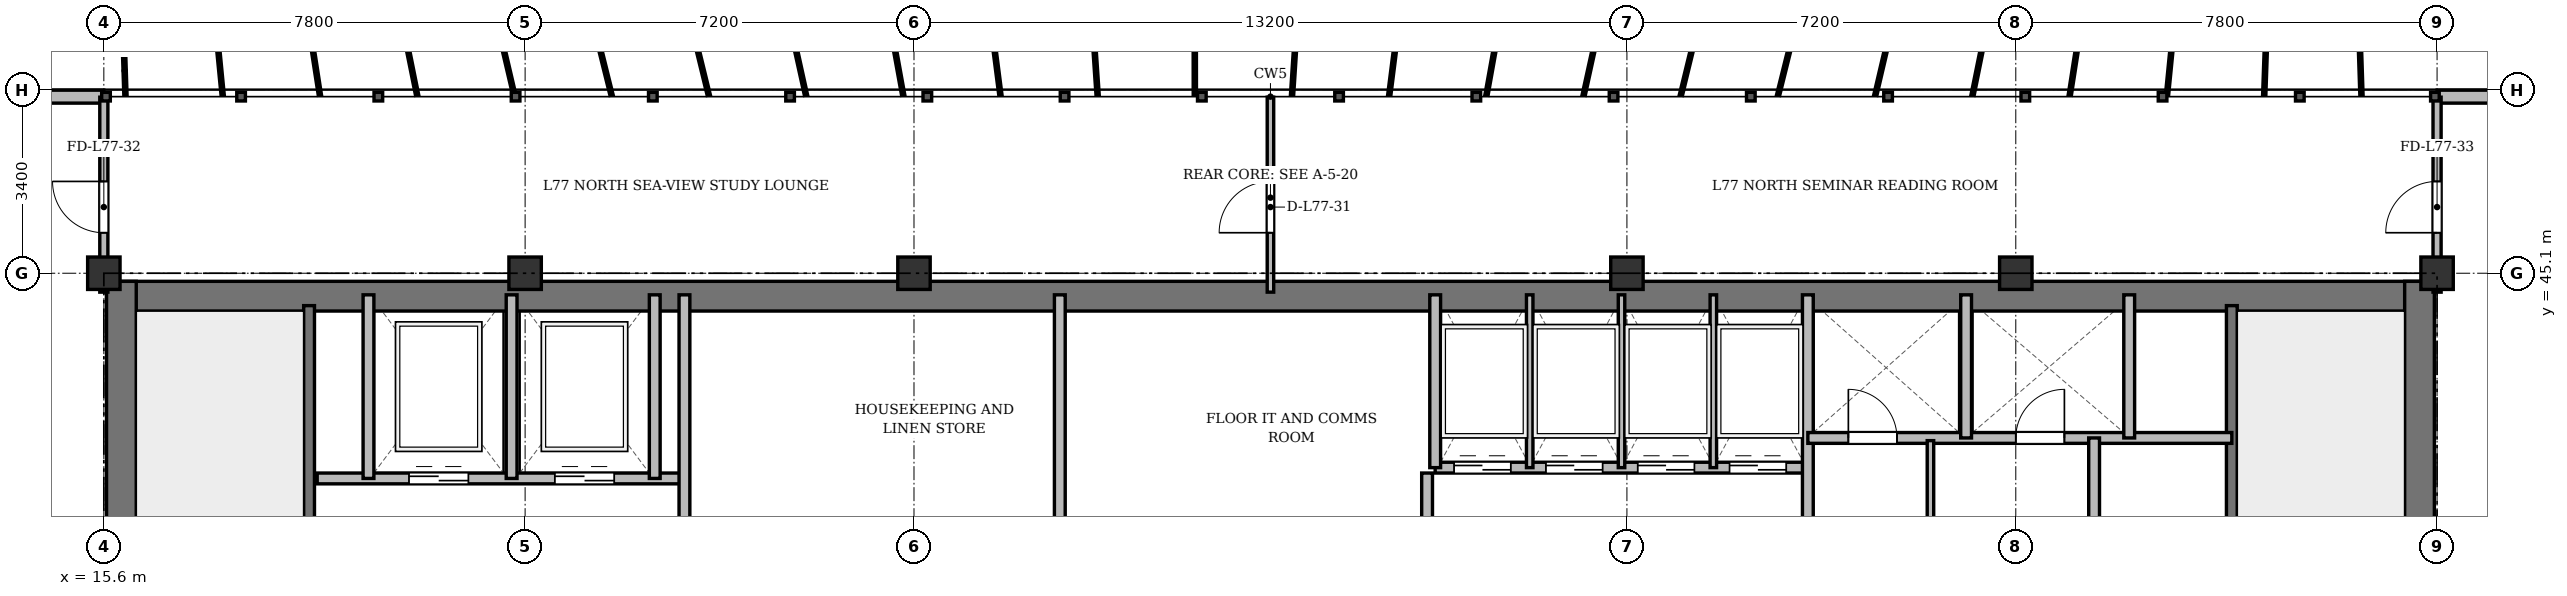
"""IFC4 building model, lengths in metres.
Left out: names, types, materials, properties, quantities, classifications, styles, units other than length and angle.
Written with IfcOpenShell. Run it as: python <this file> out.ifc"""

import sys

from ifc_helpers import new_model, si_unit, direction, frame, frame_2d, origin, origin_2d, place, context, subcontext, project, spatial, rectangle, extrude, source, transform, mapped, element, fill, save


model = new_model("IFC4")
c1 = context("Model", 3, precision=1e-05, world=origin(), true_north=direction((0.0, 1.0)))
c2 = subcontext(c1, "Body", "Model", "MODEL_VIEW")
j1 = project(units=[si_unit("LENGTHUNIT", "METRE"), si_unit("PLANEANGLEUNIT", "RADIAN")], contexts=[c1])
p1 = place(None, origin())
s1 = spatial("IfcSite", under=j1, at=p1, CompositionType="ELEMENT")
p2 = place(p1, origin())
s2 = spatial("IfcBuilding", under=s1, at=p2, CompositionType="ELEMENT")
p3 = place(p2, frame((0.0, 0.0, 295.5)))
s3 = spatial("IfcBuildingStorey", under=s2, at=p3, CompositionType="ELEMENT", Elevation=295.5)
m1 = source(origin(), c2, "Body", "SweptSolid", [
    extrude(rectangle(XDim=0.6, YDim=0.6, at=origin_2d()), origin(), (0.0, 0.0, 1.0), 3.6),
])
for number, where, z_axis, x_axis in (
    (1, (15.6, 45.1, 0.0), (0.0, 0.0, 1.0), (1.0, 0.0, 0.0)),
    (2, (23.4, 45.1, 0.0), (0.0, 0.0, 1.0), (1.0, 0.0, 0.0)),
    (3, (30.6, 45.1, 0.0), (0.0, 0.0, 1.0), (1.0, 0.0, 0.0)),
    (4, (43.8, 45.1, 0.0), (0.0, 0.0, 1.0), (1.0, 0.0, 0.0)),
    (5, (51.0, 45.1, 0.0), (0.0, 0.0, 1.0), (1.0, 0.0, 0.0)),
    (6, (58.8, 45.1, 0.0), (0.0, 0.0, 1.0), (1.0, 0.0, 0.0)),
):
    element("IfcColumn", number, at=place(p3, frame(where, z_axis=z_axis, x_axis=x_axis)), inside=s3, PredefinedType="COLUMN", context=c2, shape_type="MappedRepresentation", body=[
        mapped(m1, transform((0.0, 0.0, 0.0), x_axis=(1.0, 0.0, 0.0), y_axis=(0.0, 1.0, 0.0), z_axis=(0.0, 0.0, 1.0), scale=1.0)),
    ])
p4 = place(p3, frame((11.3, 48.37, 0.0), z_axis=(0.0, 0.0, 1.0), x_axis=(1.0, 0.0, 0.0)))
e7 = element("IfcWall", 7, at=p4, inside=s3, PredefinedType="SOLIDWALL", context=c2, shape_type="SweptSolid", body=[
    extrude(rectangle(XDim=4.3, YDim=0.24, at=frame_2d((2.15, 0.0))), origin(), (0.0, 0.0, 1.0), 3.26),
])
p5 = place(p4, frame((1.475, 0.0, 0.9)))
e8 = element("IfcOpeningElement", 8, at=p5, cuts=e7, PredefinedType="OPENING", context=c2, shape_type="SweptSolid", body=[
    extrude(rectangle(XDim=1.35, YDim=1.5, at=frame_2d((0.675, 0.75))), frame((0.0, 0.13, 0.0), z_axis=(0.0, -1.0, 0.0), x_axis=(1.0, 0.0, 0.0)), (0.0, 0.0, 1.0), 0.26),
])
p6 = place(p3, frame((58.8, 48.37, 0.0), z_axis=(0.0, 0.0, 1.0), x_axis=(1.0, 0.0, 0.0)))
e9 = element("IfcWall", 9, at=p6, inside=s3, PredefinedType="SOLIDWALL", context=c2, shape_type="SweptSolid", body=[
    extrude(rectangle(XDim=4.3, YDim=0.24, at=frame_2d((2.15, 0.0))), origin(), (0.0, 0.0, 1.0), 3.26),
])
p7 = place(p6, frame((1.475, 0.0, 0.9)))
e10 = element("IfcOpeningElement", 10, at=p7, cuts=e9, PredefinedType="OPENING", context=c2, shape_type="SweptSolid", body=[
    extrude(rectangle(XDim=1.35, YDim=1.5, at=frame_2d((0.675, 0.75))), frame((0.0, 0.13, 0.0), z_axis=(0.0, -1.0, 0.0), x_axis=(1.0, 0.0, 0.0)), (0.0, 0.0, 1.0), 0.26),
])
p8 = place(p3, frame((15.65, 44.675, 0.0), z_axis=(0.0, 0.0, 1.0), x_axis=(1.0, 0.0, 0.0)))
e11 = element("IfcWall", 11, at=p8, inside=s3, PredefinedType="SHEAR", context=c2, shape_type="SweptSolid", body=[
    extrude(rectangle(XDim=43.1, YDim=0.55, at=frame_2d((21.55, 0.0))), origin(), (0.0, 0.0, 1.0), 3.26),
])
for number, where, z_axis, x_axis in (
    (12, (15.925, 33.4, 0.0), (0.0, 0.0, 1.0), (0.0, 1.0, 0.0)),
    (13, (58.475, 33.4, 0.0), (0.0, 0.0, 1.0), (0.0, 1.0, 0.0)),
):
    element("IfcWall", number, at=place(p3, frame(where, z_axis=z_axis, x_axis=x_axis)), inside=s3, PredefinedType="SHEAR", context=c2, shape_type="SweptSolid", body=[
        extrude(rectangle(XDim=11.55, YDim=0.55, at=frame_2d((5.775, 0.0))), origin(), (0.0, 0.0, 1.0), 3.26),
    ])
p9 = place(p3, frame((19.4, 33.4, 0.0), z_axis=(0.0, 0.0, 1.0), x_axis=(0.0, 1.0, 0.0)))
e14 = element("IfcWall", 14, at=p9, inside=s3, PredefinedType="SHEAR", context=c2, shape_type="SweptSolid", body=[
    extrude(rectangle(XDim=11.1, YDim=0.2, at=frame_2d((5.55, 0.0))), origin(), (0.0, 0.0, 1.0), 3.26),
])
p10 = place(p9, frame((0.85, 0.0, 0.0)))
e15 = element("IfcOpeningElement", 15, at=p10, cuts=e14, PredefinedType="OPENING", context=c2, shape_type="SweptSolid", body=[
    extrude(rectangle(XDim=1.1, YDim=2.15, at=frame_2d((0.55, 1.075))), frame((0.0, 0.11, 0.0), z_axis=(0.0, -1.0, 0.0), x_axis=(1.0, 0.0, 0.0)), (0.0, 0.0, 1.0), 0.22),
])
p11 = place(p3, frame((55.0, 33.4, 0.0), z_axis=(0.0, 0.0, 1.0), x_axis=(0.0, 1.0, 0.0)))
e16 = element("IfcWall", 16, at=p11, inside=s3, PredefinedType="SHEAR", context=c2, shape_type="SweptSolid", body=[
    extrude(rectangle(XDim=11.1, YDim=0.2, at=frame_2d((5.55, 0.0))), origin(), (0.0, 0.0, 1.0), 3.26),
])
p12 = place(p11, frame((0.85, 0.0, 0.0)))
e17 = element("IfcOpeningElement", 17, at=p12, cuts=e16, PredefinedType="OPENING", context=c2, shape_type="SweptSolid", body=[
    extrude(rectangle(XDim=1.1, YDim=2.15, at=frame_2d((0.55, 1.075))), frame((0.0, 0.11, 0.0), z_axis=(0.0, -1.0, 0.0), x_axis=(1.0, 0.0, 0.0)), (0.0, 0.0, 1.0), 0.22),
])
p13 = place(p3, frame((19.55, 41.3, 0.0), z_axis=(0.0, 0.0, 1.0), x_axis=(1.0, 0.0, 0.0)))
e18 = element("IfcWall", 18, at=p13, inside=s3, PredefinedType="SOLIDWALL", context=c2, shape_type="SweptSolid", body=[
    extrude(rectangle(XDim=6.75, YDim=0.2, at=frame_2d((3.375, 0.0))), origin(), (0.0, 0.0, 1.0), 3.26),
])
p14 = place(p13, frame((1.7, 0.0, 0.0)))
e19 = element("IfcOpeningElement", 19, at=p14, cuts=e18, PredefinedType="OPENING", context=c2, shape_type="SweptSolid", body=[
    extrude(rectangle(XDim=1.1, YDim=2.15, at=frame_2d((0.55, 1.075))), frame((0.0, 0.11, 0.0), z_axis=(0.0, -1.0, 0.0), x_axis=(1.0, 0.0, 0.0)), (0.0, 0.0, 1.0), 0.22),
])
p15 = place(p13, frame((4.4, 0.0, 0.0)))
e20 = element("IfcOpeningElement", 20, at=p15, cuts=e18, PredefinedType="OPENING", context=c2, shape_type="SweptSolid", body=[
    extrude(rectangle(XDim=1.1, YDim=2.15, at=frame_2d((0.55, 1.075))), frame((0.0, 0.11, 0.0), z_axis=(0.0, -1.0, 0.0), x_axis=(1.0, 0.0, 0.0)), (0.0, 0.0, 1.0), 0.22),
])
for number, where, z_axis, x_axis in (
    (21, (20.5, 41.3, 0.0), (0.0, 0.0, 1.0), (0.0, 1.0, 0.0)),
    (22, (23.15, 41.3, 0.0), (0.0, 0.0, 1.0), (0.0, 1.0, 0.0)),
    (23, (25.8, 41.3, 0.0), (0.0, 0.0, 1.0), (0.0, 1.0, 0.0)),
):
    element("IfcWall", number, at=place(p3, frame(where, z_axis=z_axis, x_axis=x_axis)), inside=s3, PredefinedType="SOLIDWALL", context=c2, shape_type="SweptSolid", body=[
        extrude(rectangle(XDim=3.4, YDim=0.2, at=frame_2d((1.7, 0.0))), origin(), (0.0, 0.0, 1.0), 3.26),
    ])
for number, where, z_axis, x_axis in (
    (24, (26.35, 33.4, 0.0), (0.0, 0.0, 1.0), (0.0, 1.0, 0.0)),
    (25, (33.3, 33.4, 0.0), (0.0, 0.0, 1.0), (0.0, 1.0, 0.0)),
):
    element("IfcWall", number, at=place(p3, frame(where, z_axis=z_axis, x_axis=x_axis)), inside=s3, PredefinedType="SOLIDWALL", context=c2, shape_type="SweptSolid", body=[
        extrude(rectangle(XDim=11.3, YDim=0.2, at=frame_2d((5.65, 0.0))), origin(), (0.0, 0.0, 1.0), 2.81),
    ])
p16 = place(p3, frame((40.1, 33.4, 0.0), z_axis=(0.0, 0.0, 1.0), x_axis=(0.0, 1.0, 0.0)))
e26 = element("IfcWall", 26, at=p16, inside=s3, PredefinedType="SOLIDWALL", context=c2, shape_type="SweptSolid", body=[
    extrude(rectangle(XDim=8.0, YDim=0.2, at=frame_2d((4.0, 0.0))), origin(), (0.0, 0.0, 1.0), 2.81),
])
p17 = place(p3, frame((40.25, 41.5, 0.0), z_axis=(0.0, 0.0, 1.0), x_axis=(1.0, 0.0, 0.0)))
e27 = element("IfcWall", 27, at=p17, inside=s3, PredefinedType="SOLIDWALL", context=c2, shape_type="SweptSolid", body=[
    extrude(rectangle(XDim=6.9, YDim=0.2, at=frame_2d((3.45, 0.0))), origin(), (0.0, 0.0, 1.0), 3.26),
])
p18 = place(p17, frame((0.35, 0.0, 0.0)))
e28 = element("IfcOpeningElement", 28, at=p18, cuts=e27, PredefinedType="OPENING", context=c2, shape_type="SweptSolid", body=[
    extrude(rectangle(XDim=1.05, YDim=2.15, at=frame_2d((0.525, 1.075))), frame((0.0, 0.11, 0.0), z_axis=(0.0, -1.0, 0.0), x_axis=(1.0, 0.0, 0.0)), (0.0, 0.0, 1.0), 0.22),
])
p19 = place(p17, frame((2.05, 0.0, 0.0)))
e29 = element("IfcOpeningElement", 29, at=p19, cuts=e27, PredefinedType="OPENING", context=c2, shape_type="SweptSolid", body=[
    extrude(rectangle(XDim=1.05, YDim=2.15, at=frame_2d((0.525, 1.075))), frame((0.0, 0.11, 0.0), z_axis=(0.0, -1.0, 0.0), x_axis=(1.0, 0.0, 0.0)), (0.0, 0.0, 1.0), 0.22),
])
p20 = place(p17, frame((3.75, 0.0, 0.0)))
e30 = element("IfcOpeningElement", 30, at=p20, cuts=e27, PredefinedType="OPENING", context=c2, shape_type="SweptSolid", body=[
    extrude(rectangle(XDim=1.05, YDim=2.15, at=frame_2d((0.525, 1.075))), frame((0.0, 0.11, 0.0), z_axis=(0.0, -1.0, 0.0), x_axis=(1.0, 0.0, 0.0)), (0.0, 0.0, 1.0), 0.22),
])
p21 = place(p17, frame((5.45, 0.0, 0.0)))
e31 = element("IfcOpeningElement", 31, at=p21, cuts=e27, PredefinedType="OPENING", context=c2, shape_type="SweptSolid", body=[
    extrude(rectangle(XDim=1.05, YDim=2.15, at=frame_2d((0.525, 1.075))), frame((0.0, 0.11, 0.0), z_axis=(0.0, -1.0, 0.0), x_axis=(1.0, 0.0, 0.0)), (0.0, 0.0, 1.0), 0.22),
])
p22 = place(p3, frame((40.25, 41.5, 0.0), z_axis=(0.0, 0.0, 1.0), x_axis=(0.0, 1.0, 0.0)))
e32 = element("IfcWall", 32, at=p22, inside=s3, PredefinedType="SOLIDWALL", context=c2, shape_type="SweptSolid", body=[
    extrude(rectangle(XDim=3.2, YDim=0.2, at=frame_2d((1.6, 0.0))), origin(), (0.0, 0.0, 1.0), 3.26),
])
for number, where, z_axis, x_axis in (
    (33, (42.0, 41.5, 0.0), (0.0, 0.0, 1.0), (0.0, 1.0, 0.0)),
    (34, (43.7, 41.5, 0.0), (0.0, 0.0, 1.0), (0.0, 1.0, 0.0)),
    (35, (45.4, 41.5, 0.0), (0.0, 0.0, 1.0), (0.0, 1.0, 0.0)),
):
    element("IfcWall", number, at=place(p3, frame(where, z_axis=z_axis, x_axis=x_axis)), inside=s3, PredefinedType="PARTITIONING", context=c2, shape_type="SweptSolid", body=[
        extrude(rectangle(XDim=3.2, YDim=0.12, at=frame_2d((1.6, 0.0))), origin(), (0.0, 0.0, 1.0), 3.26),
    ])
p23 = place(p3, frame((47.15, 33.4, 0.0), z_axis=(0.0, 0.0, 1.0), x_axis=(0.0, 1.0, 0.0)))
e36 = element("IfcWall", 36, at=p23, inside=s3, PredefinedType="SOLIDWALL", context=c2, shape_type="SweptSolid", body=[
    extrude(rectangle(XDim=11.3, YDim=0.2, at=frame_2d((5.65, 0.0))), origin(), (0.0, 0.0, 1.0), 2.81),
])
p24 = place(p3, frame((47.15, 42.05, 0.0), z_axis=(0.0, 0.0, 1.0), x_axis=(1.0, 0.0, 0.0)))
e37 = element("IfcWall", 37, at=p24, inside=s3, PredefinedType="SOLIDWALL", context=c2, shape_type="SweptSolid", body=[
    extrude(rectangle(XDim=7.85, YDim=0.2, at=frame_2d((3.925, 0.0))), origin(), (0.0, 0.0, 1.0), 2.76),
])
p25 = place(p24, frame((0.75, 0.0, 0.0)))
e38 = element("IfcOpeningElement", 38, at=p25, cuts=e37, PredefinedType="OPENING", context=c2, shape_type="SweptSolid", body=[
    extrude(rectangle(XDim=0.9, YDim=2.1, at=frame_2d((0.45, 1.05))), frame((0.0, 0.11, 0.0), z_axis=(0.0, -1.0, 0.0), x_axis=(1.0, 0.0, 0.0)), (0.0, 0.0, 1.0), 0.22),
])
p26 = place(p24, frame((3.85, 0.0, 0.0)))
e39 = element("IfcOpeningElement", 39, at=p26, cuts=e37, PredefinedType="OPENING", context=c2, shape_type="SweptSolid", body=[
    extrude(rectangle(XDim=0.9, YDim=2.1, at=frame_2d((0.45, 1.05))), frame((0.0, 0.11, 0.0), z_axis=(0.0, -1.0, 0.0), x_axis=(1.0, 0.0, 0.0)), (0.0, 0.0, 1.0), 0.22),
])
for number, where, z_axis, x_axis in (
    (40, (50.08, 42.05, 0.0), (0.0, 0.0, 1.0), (0.0, 1.0, 0.0)),
    (41, (53.1, 42.05, 0.0), (0.0, 0.0, 1.0), (0.0, 1.0, 0.0)),
):
    element("IfcWall", number, at=place(p3, frame(where, z_axis=z_axis, x_axis=x_axis)), inside=s3, PredefinedType="SOLIDWALL", context=c2, shape_type="SweptSolid", body=[
        extrude(rectangle(XDim=2.65, YDim=0.2, at=frame_2d((1.325, 0.0))), origin(), (0.0, 0.0, 1.0), 3.26),
    ])
p27 = place(p3, frame((52.45, 33.4, 0.0), z_axis=(0.0, 0.0, 1.0), x_axis=(0.0, 1.0, 0.0)))
e42 = element("IfcWall", 42, at=p27, inside=s3, PredefinedType="PARTITIONING", context=c2, shape_type="SweptSolid", body=[
    extrude(rectangle(XDim=8.65, YDim=0.2, at=frame_2d((4.325, 0.0))), origin(), (0.0, 0.0, 1.0), 2.81),
])
p28 = place(p27, frame((1.15, 0.0, 0.0)))
e43 = element("IfcOpeningElement", 43, at=p28, cuts=e42, PredefinedType="OPENING", context=c2, shape_type="SweptSolid", body=[
    extrude(rectangle(XDim=0.95, YDim=2.15, at=frame_2d((0.475, 1.075))), frame((0.0, 0.11, 0.0), z_axis=(0.0, -1.0, 0.0), x_axis=(1.0, 0.0, 0.0)), (0.0, 0.0, 1.0), 0.22),
])
p29 = place(p27, frame((6.2, 0.0, 0.0)))
e44 = element("IfcOpeningElement", 44, at=p29, cuts=e42, PredefinedType="OPENING", context=c2, shape_type="SweptSolid", body=[
    extrude(rectangle(XDim=0.95, YDim=2.15, at=frame_2d((0.475, 1.075))), frame((0.0, 0.11, 0.0), z_axis=(0.0, -1.0, 0.0), x_axis=(1.0, 0.0, 0.0)), (0.0, 0.0, 1.0), 0.22),
])
p30 = place(p3, frame((49.42, 33.4, 0.0), z_axis=(0.0, 0.0, 1.0), x_axis=(0.0, 1.0, 0.0)))
e45 = element("IfcWall", 45, at=p30, inside=s3, PredefinedType="PARTITIONING", context=c2, shape_type="SweptSolid", body=[
    extrude(rectangle(XDim=8.6, YDim=0.12, at=frame_2d((4.3, 0.0))), origin(), (0.0, 0.0, 1.0), 2.81),
])
p31 = place(p30, frame((1.3, 0.0, 0.0)))
e46 = element("IfcOpeningElement", 46, at=p31, cuts=e45, PredefinedType="OPENING", context=c2, shape_type="SweptSolid", body=[
    extrude(rectangle(XDim=0.95, YDim=2.15, at=frame_2d((0.475, 1.075))), frame((0.0, 0.07, 0.0), z_axis=(0.0, -1.0, 0.0), x_axis=(1.0, 0.0, 0.0)), (0.0, 0.0, 1.0), 0.14),
])
p32 = place(p30, frame((5.5, 0.0, 0.0)))
e47 = element("IfcOpeningElement", 47, at=p32, cuts=e45, PredefinedType="OPENING", context=c2, shape_type="SweptSolid", body=[
    extrude(rectangle(XDim=0.95, YDim=2.15, at=frame_2d((0.475, 1.075))), frame((0.0, 0.07, 0.0), z_axis=(0.0, -1.0, 0.0), x_axis=(1.0, 0.0, 0.0)), (0.0, 0.0, 1.0), 0.14),
])
p33 = place(p3, frame((37.2, 44.75, 0.0), z_axis=(0.0, 0.0, 1.0), x_axis=(0.0, 1.0, 0.0)))
e48 = element("IfcWall", 48, at=p33, inside=s3, PredefinedType="PARTITIONING", context=c2, shape_type="SweptSolid", body=[
    extrude(rectangle(XDim=3.61, YDim=0.12, at=frame_2d((1.805, 0.0))), origin(), (0.0, 0.0, 1.0), 2.81),
])
p34 = place(p33, frame((1.1, 0.0, 0.0)))
e49 = element("IfcOpeningElement", 49, at=p34, cuts=e48, PredefinedType="OPENING", context=c2, shape_type="SweptSolid", body=[
    extrude(rectangle(XDim=0.95, YDim=2.15, at=frame_2d((0.475, 1.075))), frame((0.0, 0.07, 0.0), z_axis=(0.0, -1.0, 0.0), x_axis=(1.0, 0.0, 0.0)), (0.0, 0.0, 1.0), 0.14),
])
p35 = place(p3, frame((15.6, 44.75, 0.0), z_axis=(0.0, 0.0, 1.0), x_axis=(0.0, 1.0, 0.0)))
e50 = element("IfcWall", 50, at=p35, inside=s3, PredefinedType="PARTITIONING", context=c2, shape_type="SweptSolid", body=[
    extrude(rectangle(XDim=3.61, YDim=0.15, at=frame_2d((1.805, 0.0))), origin(), (0.0, 0.0, 1.0), 2.76),
])
p36 = place(p35, frame((1.1, 0.0, 0.0)))
e51 = element("IfcOpeningElement", 51, at=p36, cuts=e50, PredefinedType="OPENING", context=c2, shape_type="SweptSolid", body=[
    extrude(rectangle(XDim=0.95, YDim=2.15, at=frame_2d((0.475, 1.075))), frame((0.0, 0.085, 0.0), z_axis=(0.0, -1.0, 0.0), x_axis=(1.0, 0.0, 0.0)), (0.0, 0.0, 1.0), 0.17),
])
p37 = place(p3, frame((58.8, 44.75, 0.0), z_axis=(0.0, 0.0, 1.0), x_axis=(0.0, 1.0, 0.0)))
e52 = element("IfcWall", 52, at=p37, inside=s3, PredefinedType="PARTITIONING", context=c2, shape_type="SweptSolid", body=[
    extrude(rectangle(XDim=3.61, YDim=0.15, at=frame_2d((1.805, 0.0))), origin(), (0.0, 0.0, 1.0), 2.76),
])
p38 = place(p37, frame((1.1, 0.0, 0.0)))
e53 = element("IfcOpeningElement", 53, at=p38, cuts=e52, PredefinedType="OPENING", context=c2, shape_type="SweptSolid", body=[
    extrude(rectangle(XDim=0.95, YDim=2.15, at=frame_2d((0.475, 1.075))), frame((0.0, 0.085, 0.0), z_axis=(0.0, -1.0, 0.0), x_axis=(1.0, 0.0, 0.0)), (0.0, 0.0, 1.0), 0.17),
])
m2 = source(origin(), c2, "Body", "SweptSolid", [
    extrude(rectangle(XDim=1.1, YDim=2.15, at=frame_2d((0.55, 1.075))), frame((0.0, 0.025, 0.0), z_axis=(0.0, -1.0, 0.0), x_axis=(1.0, 0.0, 0.0)), (0.0, 0.0, 1.0), 0.05),
])
p39 = place(p14, origin())
e54 = element("IfcDoor", 54, at=p39, inside=s3, OperationType="DOUBLE_DOOR_SLIDING", PredefinedType="DOOR", context=c2, shape_type="MappedRepresentation", body=[
    mapped(m2, transform((0.0, 0.0, 0.0), x_axis=(1.0, 0.0, 0.0), y_axis=(0.0, 1.0, 0.0), z_axis=(0.0, 0.0, 1.0), scale=1.0)),
])
fill(e19, e54)
p40 = place(p15, origin())
e55 = element("IfcDoor", 55, at=p40, inside=s3, OperationType="DOUBLE_DOOR_SLIDING", PredefinedType="DOOR", context=c2, shape_type="MappedRepresentation", body=[
    mapped(m2, transform((0.0, 0.0, 0.0), x_axis=(1.0, 0.0, 0.0), y_axis=(0.0, 1.0, 0.0), z_axis=(0.0, 0.0, 1.0), scale=1.0)),
])
fill(e20, e55)
m3 = source(origin(), c2, "Body", "SweptSolid", [
    extrude(rectangle(XDim=1.05, YDim=2.15, at=frame_2d((0.525, 1.075))), frame((0.0, 0.025, 0.0), z_axis=(0.0, -1.0, 0.0), x_axis=(1.0, 0.0, 0.0)), (0.0, 0.0, 1.0), 0.05),
])
p41 = place(p18, origin())
e56 = element("IfcDoor", 56, at=p41, inside=s3, OperationType="DOUBLE_DOOR_SLIDING", PredefinedType="DOOR", context=c2, shape_type="MappedRepresentation", body=[
    mapped(m3, transform((0.0, 0.0, 0.0), x_axis=(1.0, 0.0, 0.0), y_axis=(0.0, 1.0, 0.0), z_axis=(0.0, 0.0, 1.0), scale=1.0)),
])
fill(e28, e56)
p42 = place(p19, origin())
e57 = element("IfcDoor", 57, at=p42, inside=s3, OperationType="DOUBLE_DOOR_SLIDING", PredefinedType="DOOR", context=c2, shape_type="MappedRepresentation", body=[
    mapped(m3, transform((0.0, 0.0, 0.0), x_axis=(1.0, 0.0, 0.0), y_axis=(0.0, 1.0, 0.0), z_axis=(0.0, 0.0, 1.0), scale=1.0)),
])
fill(e29, e57)
p43 = place(p20, origin())
e58 = element("IfcDoor", 58, at=p43, inside=s3, OperationType="DOUBLE_DOOR_SLIDING", PredefinedType="DOOR", context=c2, shape_type="MappedRepresentation", body=[
    mapped(m3, transform((0.0, 0.0, 0.0), x_axis=(1.0, 0.0, 0.0), y_axis=(0.0, 1.0, 0.0), z_axis=(0.0, 0.0, 1.0), scale=1.0)),
])
fill(e30, e58)
p44 = place(p21, origin())
e59 = element("IfcDoor", 59, at=p44, inside=s3, OperationType="DOUBLE_DOOR_SLIDING", PredefinedType="DOOR", context=c2, shape_type="MappedRepresentation", body=[
    mapped(m3, transform((0.0, 0.0, 0.0), x_axis=(1.0, 0.0, 0.0), y_axis=(0.0, 1.0, 0.0), z_axis=(0.0, 0.0, 1.0), scale=1.0)),
])
fill(e31, e59)
m4 = source(origin(), c2, "Body", "SweptSolid", [
    extrude(rectangle(XDim=0.9, YDim=2.1, at=frame_2d((0.45, 1.05))), frame((0.0, 0.025, 0.0), z_axis=(0.0, -1.0, 0.0), x_axis=(1.0, 0.0, 0.0)), (0.0, 0.0, 1.0), 0.05),
])
p45 = place(p25, origin())
e60 = element("IfcDoor", 60, at=p45, inside=s3, OperationType="SINGLE_SWING_LEFT", PredefinedType="DOOR", context=c2, shape_type="MappedRepresentation", body=[
    mapped(m4, transform((0.0, 0.0, 0.0), x_axis=(1.0, 0.0, 0.0), y_axis=(0.0, 1.0, 0.0), z_axis=(0.0, 0.0, 1.0), scale=1.0)),
])
fill(e38, e60)
p46 = place(p26, origin())
e61 = element("IfcDoor", 61, at=p46, inside=s3, OperationType="SINGLE_SWING_RIGHT", PredefinedType="DOOR", context=c2, shape_type="MappedRepresentation", body=[
    mapped(m4, transform((0.0, 0.0, 0.0), x_axis=(1.0, 0.0, 0.0), y_axis=(0.0, 1.0, 0.0), z_axis=(0.0, 0.0, 1.0), scale=1.0)),
])
fill(e39, e61)
m5 = source(origin(), c2, "Body", "SweptSolid", [
    extrude(rectangle(XDim=0.95, YDim=2.15, at=frame_2d((0.475, 1.075))), frame((0.0, 0.025, 0.0), z_axis=(0.0, -1.0, 0.0), x_axis=(1.0, 0.0, 0.0)), (0.0, 0.0, 1.0), 0.05),
])
p47 = place(p34, origin())
e62 = element("IfcDoor", 62, at=p47, inside=s3, OperationType="SINGLE_SWING_LEFT", PredefinedType="DOOR", context=c2, shape_type="MappedRepresentation", body=[
    mapped(m5, transform((0.0, 0.0, 0.0), x_axis=(1.0, 0.0, 0.0), y_axis=(0.0, 1.0, 0.0), z_axis=(0.0, 0.0, 1.0), scale=1.0)),
])
fill(e49, e62)
p48 = place(p36, origin())
e63 = element("IfcDoor", 63, at=p48, inside=s3, OperationType="SINGLE_SWING_RIGHT", PredefinedType="DOOR", context=c2, shape_type="MappedRepresentation", body=[
    mapped(m5, transform((0.0, 0.0, 0.0), x_axis=(1.0, 0.0, 0.0), y_axis=(0.0, 1.0, 0.0), z_axis=(0.0, 0.0, 1.0), scale=1.0)),
])
fill(e51, e63)
p49 = place(p38, origin())
e64 = element("IfcDoor", 64, at=p49, inside=s3, OperationType="SINGLE_SWING_LEFT", PredefinedType="DOOR", context=c2, shape_type="MappedRepresentation", body=[
    mapped(m5, transform((0.0, 0.0, 0.0), x_axis=(1.0, 0.0, 0.0), y_axis=(0.0, 1.0, 0.0), z_axis=(0.0, 0.0, 1.0), scale=1.0)),
])
fill(e53, e64)
save(model, sys.argv[1])
